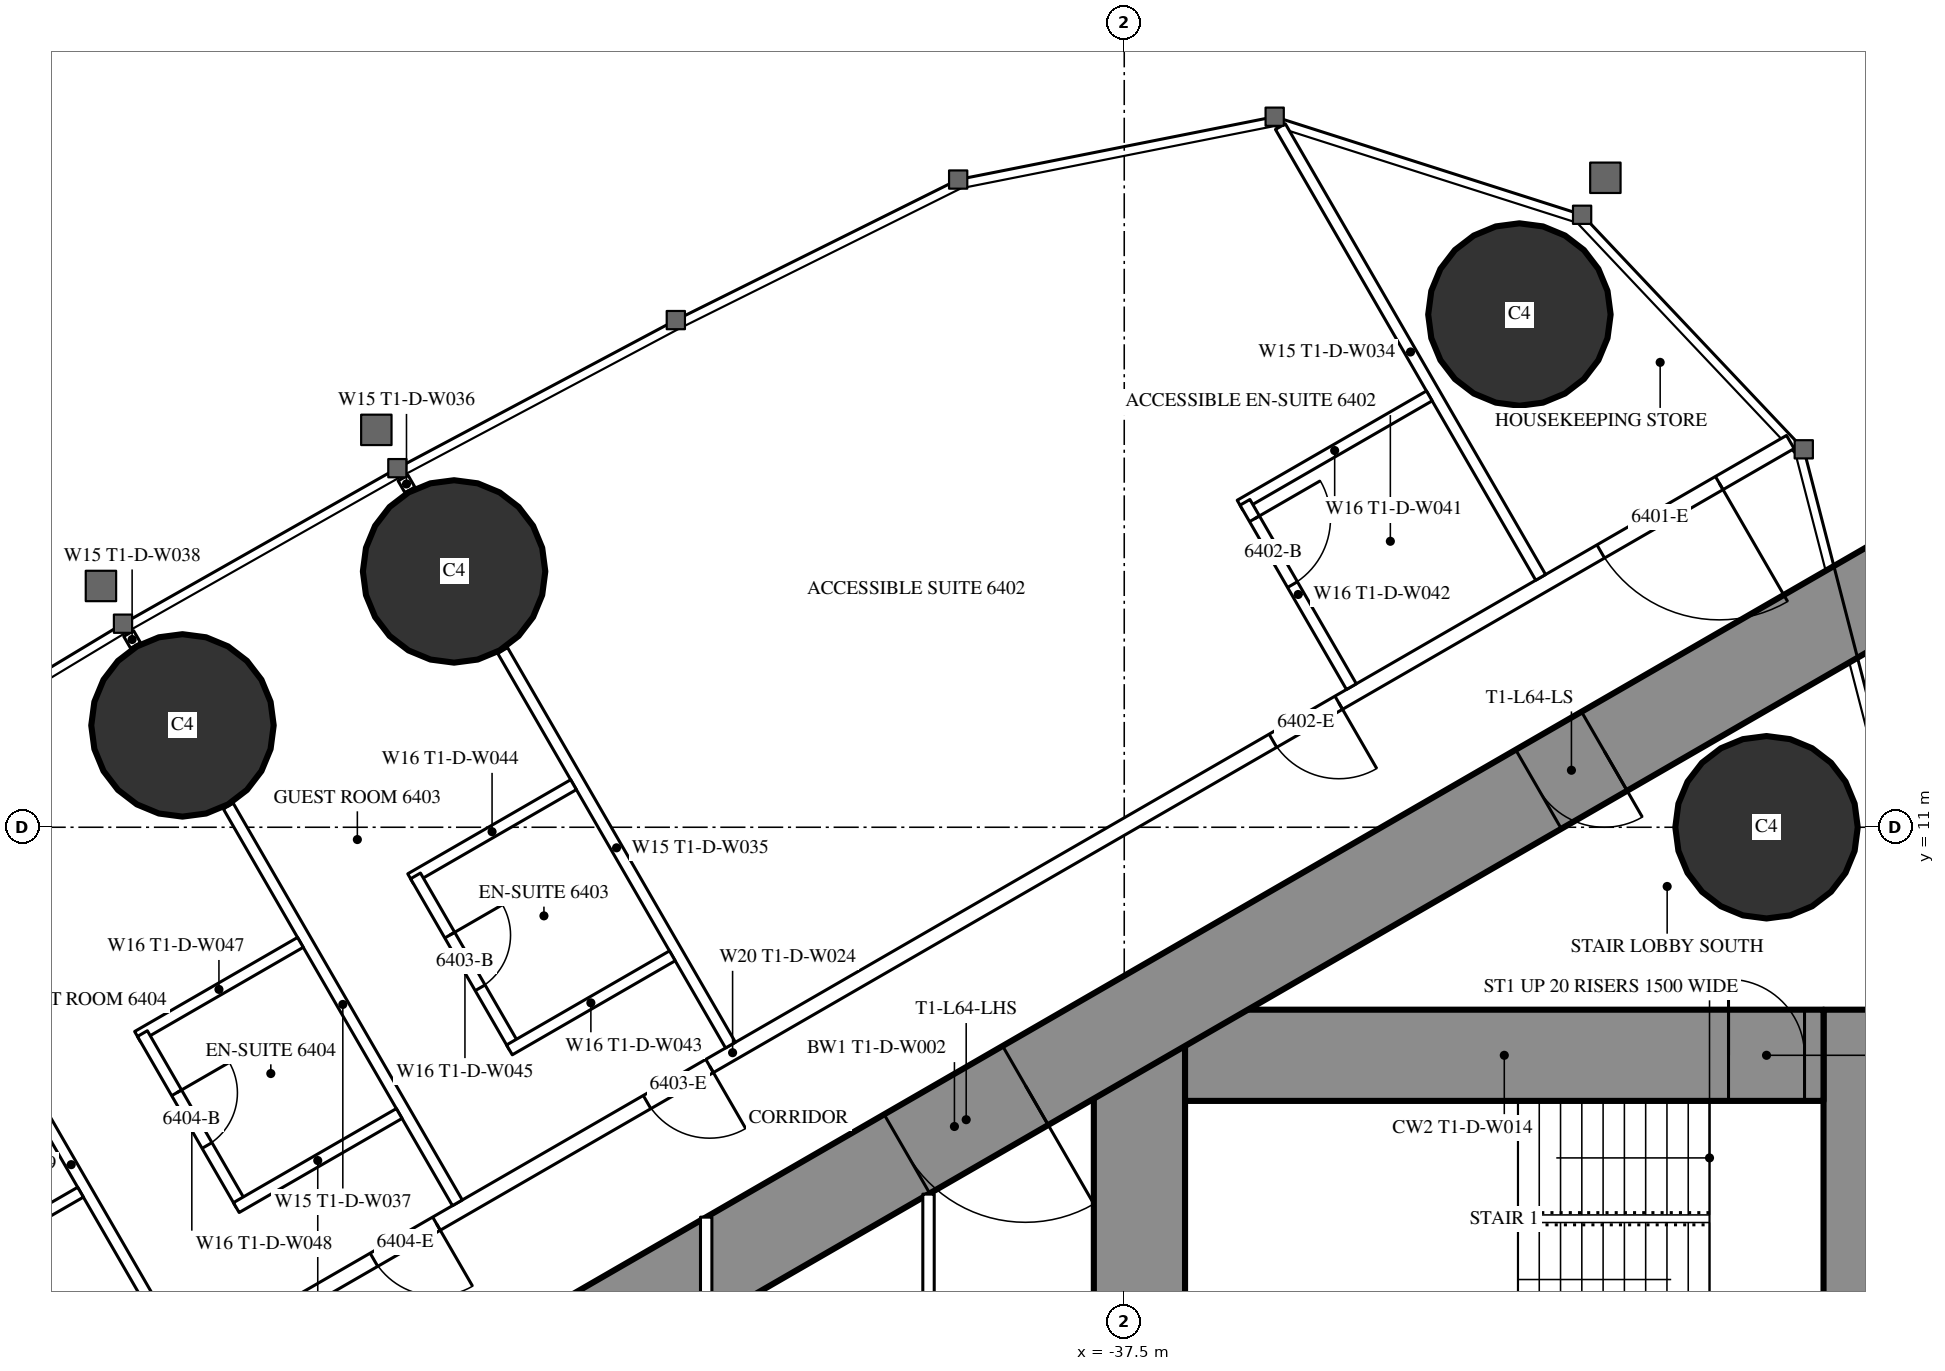
"""IFC4 building model, lengths in metres.
Left out: names, types, materials, properties, quantities, classifications, styles, units other than length and angle.
Written with IfcOpenShell. Run it as: python <this file> out.ifc"""

import sys

from ifc_helpers import new_model, si_unit, direction, frame, frame_2d, origin, origin_2d, place, context, subcontext, project, spatial, rectangle, circle, extrude, element, fill, save


model = new_model("IFC4")
c1 = context("Model", 3, precision=1e-05, world=origin(), true_north=direction((0.0, 1.0)))
c2 = subcontext(c1, "Body", "Model", "MODEL_VIEW")
j1 = project(units=[si_unit("LENGTHUNIT", "METRE"), si_unit("PLANEANGLEUNIT", "RADIAN")], contexts=[c1])
p1 = place(None, origin())
s1 = spatial("IfcSite", under=j1, at=p1, CompositionType="ELEMENT")
p2 = place(p1, origin())
s2 = spatial("IfcBuilding", under=s1, at=p2, CompositionType="ELEMENT")
p3 = place(p2, frame((0.0, 0.0, 240.5)))
s3 = spatial("IfcBuildingStorey", under=s2, at=p3, CompositionType="ELEMENT", Elevation=240.5)
for number, where, z_axis, x_axis in (
    (1, (-32.301, 17.745, 0.0), (0.0, 0.0, 1.0), (1.0, 0.0, 0.0)),
    (2, (-29.05, 11.0, 0.0), (0.0, 0.0, 1.0), (1.0, 0.0, 0.0)),
    (3, (-46.317, 14.365, 0.0), (0.0, 0.0, 1.0), (1.0, 0.0, 0.0)),
    (4, (-49.89, 12.34, 0.0), (0.0, 0.0, 1.0), (1.0, 0.0, 0.0)),
):
    element("IfcColumn", number, at=place(p3, frame(where, z_axis=z_axis, x_axis=x_axis)), inside=s3, PredefinedType="COLUMN", context=c2, shape_type="SweptSolid", body=[
        extrude(circle(Radius=1.2, at=origin_2d()), origin(), (0.0, 0.0, 1.0), 3.6),
    ])
p4 = place(p3, frame((-27.9, 8.6, 0.0), z_axis=(0.0, 0.0, 1.0), x_axis=(0.0, -1.0, 0.0)))
e5 = element("IfcWall", 5, at=p4, inside=s3, PredefinedType="SHEAR", context=c2, shape_type="SweptSolid", body=[
    extrude(rectangle(XDim=17.2, YDim=0.8, at=frame_2d((8.6, 0.0))), origin(), (0.0, 0.0, 1.0), 3.6),
])
p5 = place(p4, frame((6.95, 0.0, 0.0)))
e6 = element("IfcOpeningElement", 6, at=p5, cuts=e5, PredefinedType="OPENING", context=c2, shape_type="SweptSolid", body=[
    extrude(rectangle(XDim=0.9, YDim=2.2, at=frame_2d((0.45, 1.1))), frame((0.0, 0.41, 0.0), z_axis=(0.0, -1.0, 0.0), x_axis=(1.0, 0.0, 0.0)), (0.0, 0.0, 1.0), 0.82),
])
p6 = place(p3, frame((-37.3, 8.6, 0.0), z_axis=(0.0, 0.0, 1.0), x_axis=(0.0, -1.0, 0.0)))
e7 = element("IfcWall", 7, at=p6, inside=s3, PredefinedType="SHEAR", context=c2, shape_type="SweptSolid", body=[
    extrude(rectangle(XDim=17.2, YDim=1.2, at=frame_2d((8.6, 0.0))), origin(), (0.0, 0.0, 1.0), 3.6),
])
p7 = place(p6, frame((7.7, 0.0, 0.0)))
e8 = element("IfcOpeningElement", 8, at=p7, cuts=e7, PredefinedType="OPENING", context=c2, shape_type="SweptSolid", body=[
    extrude(rectangle(XDim=1.8, YDim=2.2, at=frame_2d((0.9, 1.1))), frame((0.0, 0.61, 0.0), z_axis=(0.0, -1.0, 0.0), x_axis=(1.0, 0.0, 0.0)), (0.0, 0.0, 1.0), 1.22),
])
p8 = place(p3, frame((-28.3, 8.0, 0.0), z_axis=(0.0, 0.0, 1.0), x_axis=(-1.0, 0.0, 0.0)))
e9 = element("IfcWall", 9, at=p8, inside=s3, PredefinedType="SHEAR", context=c2, shape_type="SweptSolid", body=[
    extrude(rectangle(XDim=8.4, YDim=1.2, at=frame_2d((4.2, 0.0))), origin(), (0.0, 0.0, 1.0), 3.6),
])
p9 = place(p8, frame((0.25, 0.0, 0.0)))
e10 = element("IfcOpeningElement", 10, at=p9, cuts=e9, PredefinedType="OPENING", context=c2, shape_type="SweptSolid", body=[
    extrude(rectangle(XDim=1.0, YDim=2.2, at=frame_2d((0.5, 1.1))), frame((0.0, 0.61, 0.0), z_axis=(0.0, -1.0, 0.0), x_axis=(1.0, 0.0, 0.0)), (0.0, 0.0, 1.0), 1.22),
])
p10 = place(p3, frame((-27.2, 14.3, 0.0), z_axis=(0.0, 0.0, 1.0), x_axis=(-0.866026593062, -0.499997940104, 0.0)))
e11 = element("IfcWall", 11, at=p10, inside=s3, PredefinedType="SHEAR", context=c2, shape_type="SweptSolid", body=[
    extrude(rectangle(XDim=28.946, YDim=1.2, at=frame_2d((14.473, 0.0))), origin(), (0.0, 0.0, 1.0), 3.6),
])
p11 = place(p10, frame((4.6, 0.0, 0.0)))
e12 = element("IfcOpeningElement", 12, at=p11, cuts=e11, PredefinedType="OPENING", context=c2, shape_type="SweptSolid", body=[
    extrude(rectangle(XDim=1.0, YDim=2.2, at=frame_2d((0.5, 1.1))), frame((0.0, 0.61, 0.0), z_axis=(0.0, -1.0, 0.0), x_axis=(1.0, 0.0, 0.0)), (0.0, 0.0, 1.0), 1.22),
])
p12 = place(p10, frame((13.395, 0.0, 0.0)))
e13 = element("IfcOpeningElement", 13, at=p12, cuts=e11, PredefinedType="OPENING", context=c2, shape_type="SweptSolid", body=[
    extrude(rectangle(XDim=1.8, YDim=2.2, at=frame_2d((0.9, 1.1))), frame((0.0, 0.61, 0.0), z_axis=(0.0, -1.0, 0.0), x_axis=(1.0, 0.0, 0.0)), (0.0, 0.0, 1.0), 1.22),
])
p13 = place(p3, frame((-28.737, 16.068, 0.0), z_axis=(0.0, 0.0, 1.0), x_axis=(-0.866026057212, -0.499998868229, 0.0)))
e14 = element("IfcWall", 14, at=p13, inside=s3, PredefinedType="PARTITIONING", context=c2, shape_type="SweptSolid", body=[
    extrude(rectangle(XDim=32.137, YDim=0.2, at=frame_2d((16.068, 0.0))), origin(), (0.0, 0.0, 1.0), 3.35),
])
p14 = place(p13, frame((1.08, 0.0, 0.0)))
e15 = element("IfcOpeningElement", 15, at=p14, cuts=e14, PredefinedType="OPENING", context=c2, shape_type="SweptSolid", body=[
    extrude(rectangle(XDim=1.8, YDim=2.03, at=frame_2d((0.9, 1.015))), frame((0.0, 0.11, 0.0), z_axis=(0.0, -1.0, 0.0), x_axis=(1.0, 0.0, 0.0)), (0.0, 0.0, 1.0), 0.22),
])
p15 = place(p13, frame((6.86, 0.0, 0.0)))
e16 = element("IfcOpeningElement", 16, at=p15, cuts=e14, PredefinedType="OPENING", context=c2, shape_type="SweptSolid", body=[
    extrude(rectangle(XDim=1.0, YDim=2.2, at=frame_2d((0.5, 1.1))), frame((0.0, 0.11, 0.0), z_axis=(0.0, -1.0, 0.0), x_axis=(1.0, 0.0, 0.0)), (0.0, 0.0, 1.0), 0.22),
])
p16 = place(p13, frame((16.418, 0.0, 0.0)))
e17 = element("IfcOpeningElement", 17, at=p16, cuts=e14, PredefinedType="OPENING", context=c2, shape_type="SweptSolid", body=[
    extrude(rectangle(XDim=0.95, YDim=2.2, at=frame_2d((0.475, 1.1))), frame((0.0, 0.11, 0.0), z_axis=(0.0, -1.0, 0.0), x_axis=(1.0, 0.0, 0.0)), (0.0, 0.0, 1.0), 0.22),
])
p17 = place(p13, frame((20.567, 0.0, 0.0)))
e18 = element("IfcOpeningElement", 18, at=p17, cuts=e14, PredefinedType="OPENING", context=c2, shape_type="SweptSolid", body=[
    extrude(rectangle(XDim=0.95, YDim=2.2, at=frame_2d((0.475, 1.1))), frame((0.0, 0.11, 0.0), z_axis=(0.0, -1.0, 0.0), x_axis=(1.0, 0.0, 0.0)), (0.0, 0.0, 1.0), 0.22),
])
p18 = place(p13, frame((27.065, 0.0, 0.0)))
e19 = element("IfcOpeningElement", 19, at=p18, cuts=e14, PredefinedType="OPENING", context=c2, shape_type="SweptSolid", body=[
    extrude(rectangle(XDim=0.95, YDim=2.2, at=frame_2d((0.475, 1.1))), frame((0.0, 0.11, 0.0), z_axis=(0.0, -1.0, 0.0), x_axis=(1.0, 0.0, 0.0)), (0.0, 0.0, 1.0), 0.22),
])
p19 = place(p3, frame((-32.022, 14.287, 0.0), z_axis=(0.0, 0.0, 1.0), x_axis=(-0.50000019414, 0.866025291697, 0.0)))
e20 = element("IfcWall", 20, at=p19, inside=s3, PredefinedType="PARTITIONING", context=c2, shape_type="SweptSolid", body=[
    extrude(rectangle(XDim=6.848, YDim=0.15, at=frame_2d((3.424, 0.0))), origin(), (0.0, 0.0, 1.0), 3.35),
])
p20 = place(p3, frame((-42.68, 8.134, 0.0), z_axis=(0.0, 0.0, 1.0), x_axis=(-0.499984479505, 0.866034364361, 0.0)))
e21 = element("IfcWall", 21, at=p20, inside=s3, PredefinedType="PARTITIONING", context=c2, shape_type="SweptSolid", body=[
    extrude(rectangle(XDim=5.995, YDim=0.15, at=frame_2d((2.998, 0.0))), origin(), (0.0, 0.0, 1.0), 2.45),
])
p21 = place(p3, frame((-46.898, 15.439, 0.0), z_axis=(0.0, 0.0, 1.0), x_axis=(-0.500232303069, 0.865891241997, 0.0)))
e22 = element("IfcWall", 22, at=p21, inside=s3, PredefinedType="PARTITIONING", context=c2, shape_type="SweptSolid", body=[
    extrude(rectangle(XDim=0.18, YDim=0.15, at=frame_2d((0.09, 0.0))), origin(), (0.0, 0.0, 1.0), 2.45),
])
p22 = place(p3, frame((-46.274, 6.059, 0.0), z_axis=(0.0, 0.0, 1.0), x_axis=(-0.500020471368, 0.866013584312, 0.0)))
e23 = element("IfcWall", 23, at=p22, inside=s3, PredefinedType="PARTITIONING", context=c2, shape_type="SweptSolid", body=[
    extrude(rectangle(XDim=6.028, YDim=0.15, at=frame_2d((3.014, 0.0))), origin(), (0.0, 0.0, 1.0), 2.45),
])
p23 = place(p3, frame((-50.508, 13.392, 0.0), z_axis=(0.0, 0.0, 1.0), x_axis=(-0.499644091975, 0.866230789891, 0.0)))
e24 = element("IfcWall", 24, at=p23, inside=s3, PredefinedType="PARTITIONING", context=c2, shape_type="SweptSolid", body=[
    extrude(rectangle(XDim=0.18, YDim=0.15, at=frame_2d((0.09, 0.0))), origin(), (0.0, 0.0, 1.0), 2.45),
])
p24 = place(p3, frame((-49.866, 3.985, 0.0), z_axis=(0.0, 0.0, 1.0), x_axis=(-0.500000694566, 0.866025002776, 0.0)))
e25 = element("IfcWall", 25, at=p24, inside=s3, PredefinedType="PARTITIONING", context=c2, shape_type="SweptSolid", body=[
    extrude(rectangle(XDim=5.95, YDim=0.15, at=frame_2d((2.975, 0.0))), origin(), (0.0, 0.0, 1.0), 2.45),
])
p25 = place(p3, frame((-33.487, 16.675, 0.0), z_axis=(0.0, 0.0, 1.0), x_axis=(-0.866039941686, -0.499974818771, 0.0)))
e26 = element("IfcWall", 26, at=p25, inside=s3, PredefinedType="PARTITIONING", context=c2, shape_type="SweptSolid", body=[
    extrude(rectangle(XDim=2.875, YDim=0.15, at=frame_2d((1.438, 0.0))), origin(), (0.0, 0.0, 1.0), 3.35),
])
p26 = place(p3, frame((-34.511, 12.85, 0.0), z_axis=(0.0, 0.0, 1.0), x_axis=(-0.500011755427, 0.866018616679, 0.0)))
e27 = element("IfcWall", 27, at=p26, inside=s3, PredefinedType="PARTITIONING", context=c2, shape_type="SweptSolid", body=[
    extrude(rectangle(XDim=2.8, YDim=0.15, at=frame_2d((1.4, 0.0))), origin(), (0.0, 0.0, 1.0), 3.35),
])
p27 = place(p26, frame((1.55, 0.0, 0.0)))
e28 = element("IfcOpeningElement", 28, at=p27, cuts=e27, PredefinedType="OPENING", context=c2, shape_type="SweptSolid", body=[
    extrude(rectangle(XDim=1.0, YDim=2.2, at=frame_2d((0.5, 1.1))), frame((0.0, 0.085, 0.0), z_axis=(0.0, -1.0, 0.0), x_axis=(1.0, 0.0, 0.0)), (0.0, 0.0, 1.0), 0.17),
])
p28 = place(p3, frame((-44.745, 11.56, 0.0), z_axis=(0.0, 0.0, 1.0), x_axis=(-0.866006523861, -0.500032699561, 0.0)))
e29 = element("IfcWall", 29, at=p28, inside=s3, PredefinedType="PARTITIONING", context=c2, shape_type="SweptSolid", body=[
    extrude(rectangle(XDim=2.475, YDim=0.15, at=frame_2d((1.237, 0.0))), origin(), (0.0, 0.0, 1.0), 3.35),
])
p29 = place(p3, frame((-45.524, 8.109, 0.0), z_axis=(0.0, 0.0, 1.0), x_axis=(-0.49997716683, 0.86603858612, 0.0)))
e30 = element("IfcWall", 30, at=p29, inside=s3, PredefinedType="PARTITIONING", context=c2, shape_type="SweptSolid", body=[
    extrude(rectangle(XDim=2.6, YDim=0.15, at=frame_2d((1.3, 0.0))), origin(), (0.0, 0.0, 1.0), 3.35),
])
p30 = place(p29, frame((0.9, 0.0, 0.0)))
e31 = element("IfcOpeningElement", 31, at=p30, cuts=e30, PredefinedType="OPENING", context=c2, shape_type="SweptSolid", body=[
    extrude(rectangle(XDim=0.8, YDim=2.2, at=frame_2d((0.4, 1.1))), frame((0.0, 0.085, 0.0), z_axis=(0.0, -1.0, 0.0), x_axis=(1.0, 0.0, 0.0)), (0.0, 0.0, 1.0), 0.17),
])
p31 = place(p3, frame((-43.445, 9.309, 0.0), z_axis=(0.0, 0.0, 1.0), x_axis=(-0.866031185235, -0.4999899861, 0.0)))
e32 = element("IfcWall", 32, at=p31, inside=s3, PredefinedType="PARTITIONING", context=c2, shape_type="SweptSolid", body=[
    extrude(rectangle(XDim=2.475, YDim=0.15, at=frame_2d((1.238, 0.0))), origin(), (0.0, 0.0, 1.0), 3.35),
])
p32 = place(p3, frame((-48.339, 9.486, 0.0), z_axis=(0.0, 0.0, 1.0), x_axis=(-0.866006523861, -0.500032699561, 0.0)))
e33 = element("IfcWall", 33, at=p32, inside=s3, PredefinedType="PARTITIONING", context=c2, shape_type="SweptSolid", body=[
    extrude(rectangle(XDim=2.475, YDim=0.15, at=frame_2d((1.237, 0.0))), origin(), (0.0, 0.0, 1.0), 3.35),
])
p33 = place(p3, frame((-49.117, 6.034, 0.0), z_axis=(0.0, 0.0, 1.0), x_axis=(-0.500006934395, 0.866021400173, 0.0)))
e34 = element("IfcWall", 34, at=p33, inside=s3, PredefinedType="PARTITIONING", context=c2, shape_type="SweptSolid", body=[
    extrude(rectangle(XDim=2.6, YDim=0.15, at=frame_2d((1.3, 0.0))), origin(), (0.0, 0.0, 1.0), 3.35),
])
p34 = place(p33, frame((0.9, 0.0, 0.0)))
e35 = element("IfcOpeningElement", 35, at=p34, cuts=e34, PredefinedType="OPENING", context=c2, shape_type="SweptSolid", body=[
    extrude(rectangle(XDim=0.8, YDim=2.2, at=frame_2d((0.4, 1.1))), frame((0.0, 0.085, 0.0), z_axis=(0.0, -1.0, 0.0), x_axis=(1.0, 0.0, 0.0)), (0.0, 0.0, 1.0), 0.17),
])
for number, where, z_axis, x_axis in (
    (36, (-47.039, 7.234, 0.0), (0.0, 0.0, 1.0), (-0.866, -0.5, 0.0)),
    (37, (-51.231, 6.199, 0.0), (0.0, 0.0, 1.0), (-0.866, -0.5, 0.0)),
):
    element("IfcWall", number, at=place(p3, frame(where, z_axis=z_axis, x_axis=x_axis)), inside=s3, PredefinedType="PARTITIONING", context=c2, shape_type="SweptSolid", body=[
        extrude(rectangle(XDim=2.475, YDim=0.15, at=frame_2d((1.238, 0.0))), origin(), (0.0, 0.0, 1.0), 3.35),
    ])
p35 = place(p3, frame((-40.075, 6.174, 0.0), z_axis=(0.0, 0.0, 1.0), x_axis=(0.0, -1.0, 0.0)))
e38 = element("IfcWall", 38, at=p35, inside=s3, PredefinedType="PARTITIONING", context=c2, shape_type="SweptSolid", body=[
    extrude(rectangle(XDim=12.348, YDim=0.15, at=frame_2d((6.174, 0.0))), origin(), (0.0, 0.0, 1.0), 3.35),
])
p36 = place(p35, frame((5.274, 0.0, 0.0)))
e39 = element("IfcOpeningElement", 39, at=p36, cuts=e38, PredefinedType="OPENING", context=c2, shape_type="SweptSolid", body=[
    extrude(rectangle(XDim=1.8, YDim=2.2, at=frame_2d((0.9, 1.1))), frame((0.0, 0.085, 0.0), z_axis=(0.0, -1.0, 0.0), x_axis=(1.0, 0.0, 0.0)), (0.0, 0.0, 1.0), 0.17),
])
p37 = place(p3, frame((-43.0, 5.871, 0.0), z_axis=(0.0, 0.0, 1.0), x_axis=(0.0, -1.0, 0.0)))
e40 = element("IfcWall", 40, at=p37, inside=s3, PredefinedType="PARTITIONING", context=c2, shape_type="SweptSolid", body=[
    extrude(rectangle(XDim=11.741, YDim=0.15, at=frame_2d((5.871, 0.0))), origin(), (0.0, 0.0, 1.0), 3.35),
])
p38 = place(p37, frame((2.435, 0.0, 0.0)))
e41 = element("IfcOpeningElement", 41, at=p38, cuts=e40, PredefinedType="OPENING", context=c2, shape_type="SweptSolid", body=[
    extrude(rectangle(XDim=1.0, YDim=2.2, at=frame_2d((0.5, 1.1))), frame((0.0, 0.085, 0.0), z_axis=(0.0, -1.0, 0.0), x_axis=(1.0, 0.0, 0.0)), (0.0, 0.0, 1.0), 0.17),
])
p39 = place(p37, frame((8.306, 0.0, 0.0)))
e42 = element("IfcOpeningElement", 42, at=p39, cuts=e40, PredefinedType="OPENING", context=c2, shape_type="SweptSolid", body=[
    extrude(rectangle(XDim=1.0, YDim=2.2, at=frame_2d((0.5, 1.1))), frame((0.0, 0.085, 0.0), z_axis=(0.0, -1.0, 0.0), x_axis=(1.0, 0.0, 0.0)), (0.0, 0.0, 1.0), 0.17),
])
p40 = place(p14, origin())
e43 = element("IfcDoor", 43, at=p40, inside=s3, OperationType="DOUBLE_DOOR_SINGLE_SWING", PredefinedType="DOOR", context=c2, shape_type="SweptSolid", body=[
    extrude(rectangle(XDim=1.8, YDim=2.03, at=frame_2d((0.9, 1.015))), frame((0.0, 0.025, 0.0), z_axis=(0.0, -1.0, 0.0), x_axis=(1.0, 0.0, 0.0)), (0.0, 0.0, 1.0), 0.05),
])
fill(e15, e43)
p41 = place(p27, origin())
e44 = element("IfcDoor", 44, at=p41, inside=s3, OperationType="SINGLE_SWING_RIGHT", PredefinedType="DOOR", context=c2, shape_type="SweptSolid", body=[
    extrude(rectangle(XDim=1.0, YDim=2.2, at=frame_2d((0.5, 1.1))), frame((0.0, 0.025, 0.0), z_axis=(0.0, -1.0, 0.0), x_axis=(1.0, 0.0, 0.0)), (0.0, 0.0, 1.0), 0.05),
])
fill(e28, e44)
p42 = place(p15, origin())
e45 = element("IfcDoor", 45, at=p42, inside=s3, OperationType="SINGLE_SWING_LEFT", PredefinedType="DOOR", context=c2, shape_type="SweptSolid", body=[
    extrude(rectangle(XDim=1.0, YDim=2.2, at=frame_2d((0.5, 1.1))), frame((0.0, 0.025, 0.0), z_axis=(0.0, -1.0, 0.0), x_axis=(1.0, 0.0, 0.0)), (0.0, 0.0, 1.0), 0.05),
])
fill(e16, e45)
p43 = place(p30, origin())
e46 = element("IfcDoor", 46, at=p43, inside=s3, OperationType="SINGLE_SWING_RIGHT", PredefinedType="DOOR", context=c2, shape_type="SweptSolid", body=[
    extrude(rectangle(XDim=0.8, YDim=2.2, at=frame_2d((0.4, 1.1))), frame((0.0, 0.025, 0.0), z_axis=(0.0, -1.0, 0.0), x_axis=(1.0, 0.0, 0.0)), (0.0, 0.0, 1.0), 0.05),
])
fill(e31, e46)
p44 = place(p16, origin())
e47 = element("IfcDoor", 47, at=p44, inside=s3, OperationType="SINGLE_SWING_LEFT", PredefinedType="DOOR", context=c2, shape_type="SweptSolid", body=[
    extrude(rectangle(XDim=0.95, YDim=2.2, at=frame_2d((0.475, 1.1))), frame((0.0, 0.025, 0.0), z_axis=(0.0, -1.0, 0.0), x_axis=(1.0, 0.0, 0.0)), (0.0, 0.0, 1.0), 0.05),
])
fill(e17, e47)
p45 = place(p34, origin())
e48 = element("IfcDoor", 48, at=p45, inside=s3, OperationType="SINGLE_SWING_RIGHT", PredefinedType="DOOR", context=c2, shape_type="SweptSolid", body=[
    extrude(rectangle(XDim=0.8, YDim=2.2, at=frame_2d((0.4, 1.1))), frame((0.0, 0.025, 0.0), z_axis=(0.0, -1.0, 0.0), x_axis=(1.0, 0.0, 0.0)), (0.0, 0.0, 1.0), 0.05),
])
fill(e35, e48)
p46 = place(p17, origin())
e49 = element("IfcDoor", 49, at=p46, inside=s3, OperationType="SINGLE_SWING_LEFT", PredefinedType="DOOR", context=c2, shape_type="SweptSolid", body=[
    extrude(rectangle(XDim=0.95, YDim=2.2, at=frame_2d((0.475, 1.1))), frame((0.0, 0.025, 0.0), z_axis=(0.0, -1.0, 0.0), x_axis=(1.0, 0.0, 0.0)), (0.0, 0.0, 1.0), 0.05),
])
fill(e18, e49)
p47 = place(p11, origin())
e50 = element("IfcDoor", 50, at=p47, inside=s3, OperationType="SINGLE_SWING_LEFT", PredefinedType="DOOR", context=c2, shape_type="SweptSolid", body=[
    extrude(rectangle(XDim=1.0, YDim=2.2, at=frame_2d((0.5, 1.1))), frame((0.0, 0.025, 0.0), z_axis=(0.0, -1.0, 0.0), x_axis=(1.0, 0.0, 0.0)), (0.0, 0.0, 1.0), 0.05),
])
fill(e12, e50)
p48 = place(p12, origin())
e51 = element("IfcDoor", 51, at=p48, inside=s3, OperationType="DOUBLE_DOOR_SINGLE_SWING", PredefinedType="DOOR", context=c2, shape_type="SweptSolid", body=[
    extrude(rectangle(XDim=1.8, YDim=2.2, at=frame_2d((0.9, 1.1))), frame((0.0, 0.025, 0.0), z_axis=(0.0, -1.0, 0.0), x_axis=(1.0, 0.0, 0.0)), (0.0, 0.0, 1.0), 0.05),
])
fill(e13, e51)
p49 = place(p9, origin())
e52 = element("IfcDoor", 52, at=p49, inside=s3, OperationType="SINGLE_SWING_RIGHT", PredefinedType="DOOR", context=c2, shape_type="SweptSolid", body=[
    extrude(rectangle(XDim=1.0, YDim=2.2, at=frame_2d((0.5, 1.1))), frame((0.0, 0.025, 0.0), z_axis=(0.0, -1.0, 0.0), x_axis=(1.0, 0.0, 0.0)), (0.0, 0.0, 1.0), 0.05),
])
fill(e10, e52)
save(model, sys.argv[1])
